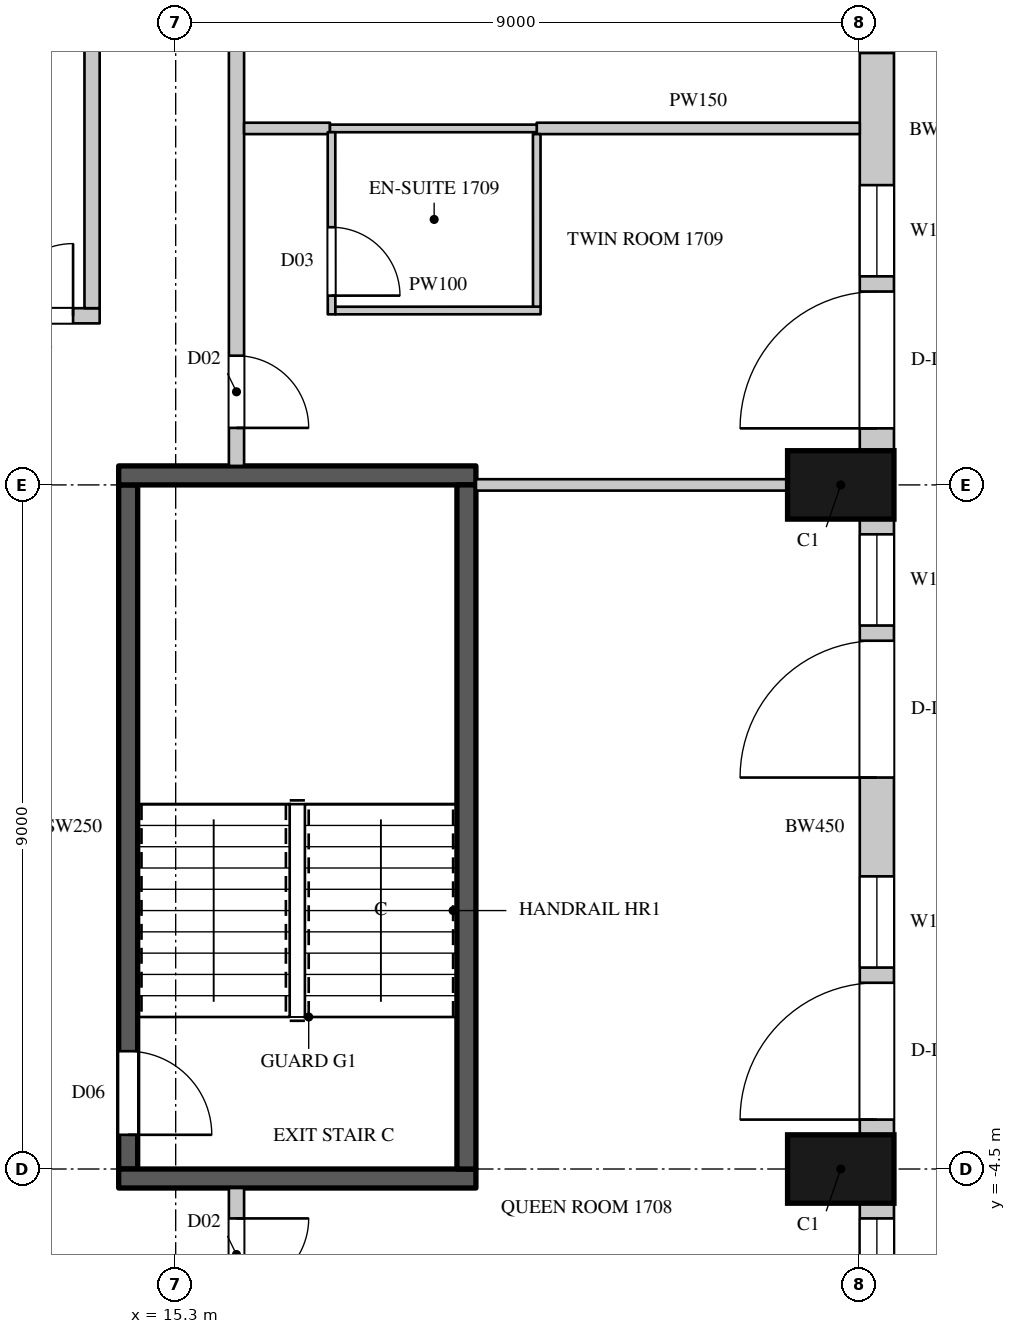
"""IFC4 building model, lengths in metres.
Left out: names, types, materials, properties, quantities, classifications, styles, units other than length and angle.
Written with IfcOpenShell. Run it as: python <this file> out.ifc"""

import sys

from ifc_helpers import new_model, si_unit, direction, frame, frame_2d, origin, origin_2d, place, context, subcontext, project, spatial, rectangle, extrude, element, fill, save


model = new_model("IFC4")
c1 = context("Model", 3, precision=1e-05, world=origin(), true_north=direction((0.0, 1.0)))
c2 = subcontext(c1, "Body", "Model", "MODEL_VIEW")
j1 = project(units=[si_unit("LENGTHUNIT", "METRE"), si_unit("PLANEANGLEUNIT", "RADIAN")], contexts=[c1])
p1 = place(None, origin())
s1 = spatial("IfcSite", under=j1, at=p1, CompositionType="ELEMENT")
p2 = place(p1, origin())
s2 = spatial("IfcBuilding", under=s1, at=p2, CompositionType="ELEMENT")
p3 = place(p2, frame((0.0, 0.0, 91.5)))
s3 = spatial("IfcBuildingStorey", under=s2, at=p3, CompositionType="ELEMENT", Elevation=91.5)
for number, where, z_axis, x_axis in (
    (1, (24.05, -4.5, 0.0), (0.0, 0.0, 1.0), (0.0, 1.0, 0.0)),
    (2, (24.05, 4.5, 0.0), (0.0, 0.0, 1.0), (0.0, 1.0, 0.0)),
):
    element("IfcColumn", number, at=place(p3, frame(where, z_axis=z_axis, x_axis=x_axis)), inside=s3, PredefinedType="COLUMN", context=c2, shape_type="SweptSolid", body=[
        extrude(rectangle(XDim=0.9, YDim=1.4, at=origin_2d()), origin(), (0.0, 0.0, 1.0), 3.6),
    ])
p4 = place(p3, frame((24.525, -13.05, 0.0), z_axis=(0.0, 0.0, 1.0), x_axis=(0.0, 1.0, 0.0)))
e3 = element("IfcWall", 3, at=p4, inside=s3, PredefinedType="SOLIDWALL", context=c2, shape_type="SweptSolid", body=[
    extrude(rectangle(XDim=8.1, YDim=0.45, at=frame_2d((4.05, 0.0))), origin(), (0.0, 0.0, 1.0), 3.3),
])
p5 = place(p4, frame((0.9, 0.0, 0.0)))
e4 = element("IfcOpeningElement", 4, at=p5, cuts=e3, PredefinedType="OPENING", context=c2, shape_type="SweptSolid", body=[
    extrude(rectangle(XDim=1.8, YDim=2.4, at=frame_2d((0.9, 1.2))), frame((0.0, 0.235, 0.0), z_axis=(0.0, -1.0, 0.0), x_axis=(1.0, 0.0, 0.0)), (0.0, 0.0, 1.0), 0.47),
])
p6 = place(p4, frame((4.7, 0.0, 0.0)))
e5 = element("IfcOpeningElement", 5, at=p6, cuts=e3, PredefinedType="OPENING", context=c2, shape_type="SweptSolid", body=[
    extrude(rectangle(XDim=1.8, YDim=2.4, at=frame_2d((0.9, 1.2))), frame((0.0, 0.235, 0.0), z_axis=(0.0, -1.0, 0.0), x_axis=(1.0, 0.0, 0.0)), (0.0, 0.0, 1.0), 0.47),
])
p7 = place(p4, frame((6.7, 0.0, 1.05)))
e6 = element("IfcOpeningElement", 6, at=p7, cuts=e3, PredefinedType="OPENING", context=c2, shape_type="SweptSolid", body=[
    extrude(rectangle(XDim=1.2, YDim=2.0, at=frame_2d((0.6, 1.0))), frame((0.0, 0.235, 0.0), z_axis=(0.0, -1.0, 0.0), x_axis=(1.0, 0.0, 0.0)), (0.0, 0.0, 1.0), 0.47),
])
p8 = place(p3, frame((24.525, -4.05, 0.0), z_axis=(0.0, 0.0, 1.0), x_axis=(0.0, 1.0, 0.0)))
e7 = element("IfcWall", 7, at=p8, inside=s3, PredefinedType="SOLIDWALL", context=c2, shape_type="SweptSolid", body=[
    extrude(rectangle(XDim=8.1, YDim=0.45, at=frame_2d((4.05, 0.0))), origin(), (0.0, 0.0, 1.0), 3.3),
])
p9 = place(p8, frame((0.2, 0.0, 0.0)))
e8 = element("IfcOpeningElement", 8, at=p9, cuts=e7, PredefinedType="OPENING", context=c2, shape_type="SweptSolid", body=[
    extrude(rectangle(XDim=1.8, YDim=2.4, at=frame_2d((0.9, 1.2))), frame((0.0, 0.235, 0.0), z_axis=(0.0, -1.0, 0.0), x_axis=(1.0, 0.0, 0.0)), (0.0, 0.0, 1.0), 0.47),
])
p10 = place(p8, frame((2.2, 0.0, 1.05)))
e9 = element("IfcOpeningElement", 9, at=p10, cuts=e7, PredefinedType="OPENING", context=c2, shape_type="SweptSolid", body=[
    extrude(rectangle(XDim=1.2, YDim=2.0, at=frame_2d((0.6, 1.0))), frame((0.0, 0.235, 0.0), z_axis=(0.0, -1.0, 0.0), x_axis=(1.0, 0.0, 0.0)), (0.0, 0.0, 1.0), 0.47),
])
p11 = place(p8, frame((4.7, 0.0, 0.0)))
e10 = element("IfcOpeningElement", 10, at=p11, cuts=e7, PredefinedType="OPENING", context=c2, shape_type="SweptSolid", body=[
    extrude(rectangle(XDim=1.8, YDim=2.4, at=frame_2d((0.9, 1.2))), frame((0.0, 0.235, 0.0), z_axis=(0.0, -1.0, 0.0), x_axis=(1.0, 0.0, 0.0)), (0.0, 0.0, 1.0), 0.47),
])
p12 = place(p8, frame((6.7, 0.0, 1.05)))
e11 = element("IfcOpeningElement", 11, at=p12, cuts=e7, PredefinedType="OPENING", context=c2, shape_type="SweptSolid", body=[
    extrude(rectangle(XDim=1.2, YDim=2.0, at=frame_2d((0.6, 1.0))), frame((0.0, 0.235, 0.0), z_axis=(0.0, -1.0, 0.0), x_axis=(1.0, 0.0, 0.0)), (0.0, 0.0, 1.0), 0.47),
])
p13 = place(p3, frame((24.525, 4.95, 0.0), z_axis=(0.0, 0.0, 1.0), x_axis=(0.0, 1.0, 0.0)))
e12 = element("IfcWall", 12, at=p13, inside=s3, PredefinedType="SOLIDWALL", context=c2, shape_type="SweptSolid", body=[
    extrude(rectangle(XDim=8.439, YDim=0.45, at=frame_2d((4.219, 0.0))), origin(), (0.0, 0.0, 1.0), 3.3),
])
p14 = place(p13, frame((0.294, 0.0, 0.0)))
e13 = element("IfcOpeningElement", 13, at=p14, cuts=e12, PredefinedType="OPENING", context=c2, shape_type="SweptSolid", body=[
    extrude(rectangle(XDim=1.8, YDim=2.4, at=frame_2d((0.9, 1.2))), frame((0.0, 0.235, 0.0), z_axis=(0.0, -1.0, 0.0), x_axis=(1.0, 0.0, 0.0)), (0.0, 0.0, 1.0), 0.47),
])
p15 = place(p13, frame((2.294, 0.0, 1.05)))
e14 = element("IfcOpeningElement", 14, at=p15, cuts=e12, PredefinedType="OPENING", context=c2, shape_type="SweptSolid", body=[
    extrude(rectangle(XDim=1.2, YDim=2.0, at=frame_2d((0.6, 1.0))), frame((0.0, 0.235, 0.0), z_axis=(0.0, -1.0, 0.0), x_axis=(1.0, 0.0, 0.0)), (0.0, 0.0, 1.0), 0.47),
])
p16 = place(p13, frame((5.232, 0.0, 1.05)))
e15 = element("IfcOpeningElement", 15, at=p16, cuts=e12, PredefinedType="OPENING", context=c2, shape_type="SweptSolid", body=[
    extrude(rectangle(XDim=2.7, YDim=2.0, at=frame_2d((1.35, 1.0))), frame((0.0, 0.235, 0.0), z_axis=(0.0, -1.0, 0.0), x_axis=(1.0, 0.0, 0.0)), (0.0, 0.0, 1.0), 0.47),
])
p17 = place(p3, frame((10.9, 6.725, 0.0), z_axis=(0.0, 0.0, 1.0), x_axis=(1.0, 0.0, 0.0)))
e16 = element("IfcWall", 16, at=p17, inside=s3, PredefinedType="PARTITIONING", context=c2, shape_type="SweptSolid", body=[
    extrude(rectangle(XDim=3.4, YDim=0.2, at=frame_2d((1.7, 0.0))), origin(), (0.0, 0.0, 1.0), 3.3),
])
p18 = place(p17, frame((2.1, 0.0, 0.0)))
e17 = element("IfcOpeningElement", 17, at=p18, cuts=e16, PredefinedType="OPENING", context=c2, shape_type="SweptSolid", body=[
    extrude(rectangle(XDim=0.95, YDim=2.2, at=frame_2d((0.475, 1.1))), frame((0.0, 0.11, 0.0), z_axis=(0.0, -1.0, 0.0), x_axis=(1.0, 0.0, 0.0)), (0.0, 0.0, 1.0), 0.22),
])
p19 = place(p3, frame((14.2, 6.825, 0.0), z_axis=(0.0, 0.0, 1.0), x_axis=(0.0, 1.0, 0.0)))
e18 = element("IfcWall", 18, at=p19, inside=s3, PredefinedType="PARTITIONING", context=c2, shape_type="SweptSolid", body=[
    extrude(rectangle(XDim=8.675, YDim=0.2, at=frame_2d((4.337, 0.0))), origin(), (0.0, 0.0, 1.0), 3.3),
])
p20 = place(p3, frame((16.1, -17.5, 0.0), z_axis=(0.0, 0.0, 1.0), x_axis=(0.0, 1.0, 0.0)))
e19 = element("IfcWall", 19, at=p20, inside=s3, PredefinedType="PARTITIONING", context=c2, shape_type="SweptSolid", body=[
    extrude(rectangle(XDim=12.75, YDim=0.2, at=frame_2d((6.375, 0.0))), origin(), (0.0, 0.0, 1.0), 3.3),
])
p21 = place(p20, frame((2.75, 0.0, 0.0)))
e20 = element("IfcOpeningElement", 20, at=p21, cuts=e19, PredefinedType="OPENING", context=c2, shape_type="SweptSolid", body=[
    extrude(rectangle(XDim=0.95, YDim=2.2, at=frame_2d((0.475, 1.1))), frame((0.0, 0.11, 0.0), z_axis=(0.0, -1.0, 0.0), x_axis=(1.0, 0.0, 0.0)), (0.0, 0.0, 1.0), 0.22),
])
p22 = place(p20, frame((6.95, 0.0, 0.0)))
e21 = element("IfcOpeningElement", 21, at=p22, cuts=e19, PredefinedType="OPENING", context=c2, shape_type="SweptSolid", body=[
    extrude(rectangle(XDim=0.95, YDim=2.2, at=frame_2d((0.475, 1.1))), frame((0.0, 0.11, 0.0), z_axis=(0.0, -1.0, 0.0), x_axis=(1.0, 0.0, 0.0)), (0.0, 0.0, 1.0), 0.22),
])
p23 = place(p20, frame((11.4, 0.0, 0.0)))
e22 = element("IfcOpeningElement", 22, at=p23, cuts=e19, PredefinedType="OPENING", context=c2, shape_type="SweptSolid", body=[
    extrude(rectangle(XDim=0.95, YDim=2.2, at=frame_2d((0.475, 1.1))), frame((0.0, 0.11, 0.0), z_axis=(0.0, -1.0, 0.0), x_axis=(1.0, 0.0, 0.0)), (0.0, 0.0, 1.0), 0.22),
])
p24 = place(p3, frame((16.1, 4.75, 0.0), z_axis=(0.0, 0.0, 1.0), x_axis=(0.0, 1.0, 0.0)))
e23 = element("IfcWall", 23, at=p24, inside=s3, PredefinedType="PARTITIONING", context=c2, shape_type="SweptSolid", body=[
    extrude(rectangle(XDim=12.65, YDim=0.2, at=frame_2d((6.325, 0.0))), origin(), (0.0, 0.0, 1.0), 3.3),
])
p25 = place(p24, frame((0.5, 0.0, 0.0)))
e24 = element("IfcOpeningElement", 24, at=p25, cuts=e23, PredefinedType="OPENING", context=c2, shape_type="SweptSolid", body=[
    extrude(rectangle(XDim=0.95, YDim=2.2, at=frame_2d((0.475, 1.1))), frame((0.0, 0.11, 0.0), z_axis=(0.0, -1.0, 0.0), x_axis=(1.0, 0.0, 0.0)), (0.0, 0.0, 1.0), 0.22),
])
p26 = place(p24, frame((6.9, 0.0, 0.0)))
e25 = element("IfcOpeningElement", 25, at=p26, cuts=e23, PredefinedType="OPENING", context=c2, shape_type="SweptSolid", body=[
    extrude(rectangle(XDim=0.95, YDim=2.2, at=frame_2d((0.475, 1.1))), frame((0.0, 0.11, 0.0), z_axis=(0.0, -1.0, 0.0), x_axis=(1.0, 0.0, 0.0)), (0.0, 0.0, 1.0), 0.22),
])
p27 = place(p3, frame((16.2, 9.19, 0.0), z_axis=(0.0, 0.0, 1.0), x_axis=(1.0, 0.0, 0.0)))
e26 = element("IfcWall", 26, at=p27, inside=s3, PredefinedType="PARTITIONING", context=c2, shape_type="SweptSolid", body=[
    extrude(rectangle(XDim=1.13, YDim=0.15, at=frame_2d((0.565, 0.0))), origin(), (0.0, 0.0, 1.0), 2.65),
])
p28 = place(p3, frame((19.25, 4.5, 0.0), z_axis=(0.0, 0.0, 1.0), x_axis=(1.0, 0.0, 0.0)))
e27 = element("IfcWall", 27, at=p28, inside=s3, PredefinedType="PARTITIONING", context=c2, shape_type="SweptSolid", body=[
    extrude(rectangle(XDim=4.1, YDim=0.15, at=frame_2d((2.05, 0.0))), origin(), (0.0, 0.0, 1.0), 3.3),
])
p29 = place(p3, frame((20.05, 9.19, 0.0), z_axis=(0.0, 0.0, 1.0), x_axis=(1.0, 0.0, 0.0)))
e28 = element("IfcWall", 28, at=p29, inside=s3, PredefinedType="PARTITIONING", context=c2, shape_type="SweptSolid", body=[
    extrude(rectangle(XDim=4.25, YDim=0.15, at=frame_2d((2.125, 0.0))), origin(), (0.0, 0.0, 1.0), 2.65),
])
p30 = place(p3, frame((14.675, -4.5, 0.0), z_axis=(0.0, 0.0, 1.0), x_axis=(0.0, 1.0, 0.0)))
e29 = element("IfcWall", 29, at=p30, inside=s3, PredefinedType="SHEAR", context=c2, shape_type="SweptSolid", body=[
    extrude(rectangle(XDim=9.0, YDim=0.25, at=frame_2d((4.5, 0.0))), origin(), (0.0, 0.0, 1.0), 3.3),
])
p31 = place(p30, frame((0.45, 0.0, 0.0)))
e30 = element("IfcOpeningElement", 30, at=p31, cuts=e29, PredefinedType="OPENING", context=c2, shape_type="SweptSolid", body=[
    extrude(rectangle(XDim=1.1, YDim=2.2, at=frame_2d((0.55, 1.1))), frame((0.0, 0.135, 0.0), z_axis=(0.0, -1.0, 0.0), x_axis=(1.0, 0.0, 0.0)), (0.0, 0.0, 1.0), 0.27),
])
for number, where, z_axis, x_axis in (
    (31, (14.55, -4.625, 0.0), (0.0, 0.0, 1.0), (1.0, 0.0, 0.0)),
    (32, (14.55, 4.625, 0.0), (0.0, 0.0, 1.0), (1.0, 0.0, 0.0)),
):
    element("IfcWall", number, at=place(p3, frame(where, z_axis=z_axis, x_axis=x_axis)), inside=s3, PredefinedType="SHEAR", context=c2, shape_type="SweptSolid", body=[
        extrude(rectangle(XDim=4.7, YDim=0.25, at=frame_2d((2.35, 0.0))), origin(), (0.0, 0.0, 1.0), 3.3),
    ])
p32 = place(p3, frame((19.125, -4.5, 0.0), z_axis=(0.0, 0.0, 1.0), x_axis=(0.0, 1.0, 0.0)))
e33 = element("IfcWall", 33, at=p32, inside=s3, PredefinedType="SHEAR", context=c2, shape_type="SweptSolid", body=[
    extrude(rectangle(XDim=9.0, YDim=0.25, at=frame_2d((4.5, 0.0))), origin(), (0.0, 0.0, 1.0), 3.3),
])
p33 = place(p3, frame((17.33, 9.19, 0.0), z_axis=(0.0, 0.0, 1.0), x_axis=(1.0, 0.0, 0.0)))
e34 = element("IfcWall", 34, at=p33, inside=s3, PredefinedType="PARTITIONING", context=c2, shape_type="SweptSolid", body=[
    extrude(rectangle(XDim=2.72, YDim=0.1, at=frame_2d((1.36, 0.0))), origin(), (0.0, 0.0, 1.0), 2.65),
])
p34 = place(p3, frame((17.35, 9.14, 0.0), z_axis=(0.0, 0.0, 1.0), x_axis=(0.000407580973, -0.999999916939, 0.0)))
e35 = element("IfcWall", 35, at=p34, inside=s3, PredefinedType="PARTITIONING", context=c2, shape_type="SweptSolid", body=[
    extrude(rectangle(XDim=2.396, YDim=0.1, at=frame_2d((1.198, 0.0))), origin(), (0.0, 0.0, 1.0), 3.3),
])
p35 = place(p34, frame((1.25, 0.0, 0.0)))
e36 = element("IfcOpeningElement", 36, at=p35, cuts=e35, PredefinedType="OPENING", context=c2, shape_type="SweptSolid", body=[
    extrude(rectangle(XDim=0.9, YDim=2.2, at=frame_2d((0.45, 1.1))), frame((0.0, 0.06, 0.0), z_axis=(0.0, -1.0, 0.0), x_axis=(1.0, 0.0, 0.0)), (0.0, 0.0, 1.0), 0.12),
])
p36 = place(p3, frame((17.401, 6.794, 0.0), z_axis=(0.0, 0.0, 1.0), x_axis=(0.9999999346, 0.000361663629, 0.0)))
e37 = element("IfcWall", 37, at=p36, inside=s3, PredefinedType="PARTITIONING", context=c2, shape_type="SweptSolid", body=[
    extrude(rectangle(XDim=2.7, YDim=0.1, at=frame_2d((1.35, 0.0))), origin(), (0.0, 0.0, 1.0), 3.3),
])
p37 = place(p3, frame((20.05, 9.115, 0.0), z_axis=(0.0, 0.0, 1.0), x_axis=(0.000430200003, -0.999999907464, 0.0)))
e38 = element("IfcWall", 38, at=p37, inside=s3, PredefinedType="PARTITIONING", context=c2, shape_type="SweptSolid", body=[
    extrude(rectangle(XDim=2.27, YDim=0.1, at=frame_2d((1.135, 0.0))), origin(), (0.0, 0.0, 1.0), 3.3),
])
p38 = place(p7, origin())
e39 = element("IfcWindow", 39, at=p38, inside=s3, PartitioningType="SINGLE_PANEL", PredefinedType="WINDOW", context=c2, shape_type="SweptSolid", body=[
    extrude(rectangle(XDim=1.2, YDim=2.0, at=frame_2d((0.6, 1.0))), frame((0.0, 0.135, 0.0), z_axis=(0.0, -1.0, 0.0), x_axis=(1.0, 0.0, 0.0)), (0.0, 0.0, 1.0), 0.06),
])
fill(e6, e39)
p39 = place(p9, origin())
e40 = element("IfcDoor", 40, at=p39, inside=s3, OperationType="SLIDING_TO_LEFT", PredefinedType="DOOR", context=c2, shape_type="SweptSolid", body=[
    extrude(rectangle(XDim=1.8, YDim=2.4, at=frame_2d((0.9, 1.2))), frame((0.0, 0.13, 0.0), z_axis=(0.0, -1.0, 0.0), x_axis=(1.0, 0.0, 0.0)), (0.0, 0.0, 1.0), 0.05),
])
fill(e8, e40)
p40 = place(p10, origin())
e41 = element("IfcWindow", 41, at=p40, inside=s3, PartitioningType="SINGLE_PANEL", PredefinedType="WINDOW", context=c2, shape_type="SweptSolid", body=[
    extrude(rectangle(XDim=1.2, YDim=2.0, at=frame_2d((0.6, 1.0))), frame((0.0, 0.135, 0.0), z_axis=(0.0, -1.0, 0.0), x_axis=(1.0, 0.0, 0.0)), (0.0, 0.0, 1.0), 0.06),
])
fill(e9, e41)
p41 = place(p11, origin())
e42 = element("IfcDoor", 42, at=p41, inside=s3, OperationType="SLIDING_TO_LEFT", PredefinedType="DOOR", context=c2, shape_type="SweptSolid", body=[
    extrude(rectangle(XDim=1.8, YDim=2.4, at=frame_2d((0.9, 1.2))), frame((0.0, 0.13, 0.0), z_axis=(0.0, -1.0, 0.0), x_axis=(1.0, 0.0, 0.0)), (0.0, 0.0, 1.0), 0.05),
])
fill(e10, e42)
p42 = place(p12, origin())
e43 = element("IfcWindow", 43, at=p42, inside=s3, PartitioningType="SINGLE_PANEL", PredefinedType="WINDOW", context=c2, shape_type="SweptSolid", body=[
    extrude(rectangle(XDim=1.2, YDim=2.0, at=frame_2d((0.6, 1.0))), frame((0.0, 0.135, 0.0), z_axis=(0.0, -1.0, 0.0), x_axis=(1.0, 0.0, 0.0)), (0.0, 0.0, 1.0), 0.06),
])
fill(e11, e43)
p43 = place(p14, origin())
e44 = element("IfcDoor", 44, at=p43, inside=s3, OperationType="SLIDING_TO_LEFT", PredefinedType="DOOR", context=c2, shape_type="SweptSolid", body=[
    extrude(rectangle(XDim=1.8, YDim=2.4, at=frame_2d((0.9, 1.2))), frame((0.0, 0.13, 0.0), z_axis=(0.0, -1.0, 0.0), x_axis=(1.0, 0.0, 0.0)), (0.0, 0.0, 1.0), 0.05),
])
fill(e13, e44)
p44 = place(p15, origin())
e45 = element("IfcWindow", 45, at=p44, inside=s3, PartitioningType="SINGLE_PANEL", PredefinedType="WINDOW", context=c2, shape_type="SweptSolid", body=[
    extrude(rectangle(XDim=1.2, YDim=2.0, at=frame_2d((0.6, 1.0))), frame((0.0, 0.135, 0.0), z_axis=(0.0, -1.0, 0.0), x_axis=(1.0, 0.0, 0.0)), (0.0, 0.0, 1.0), 0.06),
])
fill(e14, e45)
p45 = place(p16, origin())
e46 = element("IfcWindow", 46, at=p45, inside=s3, PartitioningType="SINGLE_PANEL", PredefinedType="WINDOW", context=c2, shape_type="SweptSolid", body=[
    extrude(rectangle(XDim=2.7, YDim=2.0, at=frame_2d((1.35, 1.0))), frame((0.0, 0.135, 0.0), z_axis=(0.0, -1.0, 0.0), x_axis=(1.0, 0.0, 0.0)), (0.0, 0.0, 1.0), 0.06),
])
fill(e15, e46)
p46 = place(p18, origin())
e47 = element("IfcDoor", 47, at=p46, inside=s3, OperationType="SINGLE_SWING_RIGHT", PredefinedType="DOOR", context=c2, shape_type="SweptSolid", body=[
    extrude(rectangle(XDim=0.95, YDim=2.2, at=frame_2d((0.475, 1.1))), frame((0.0, 0.025, 0.0), z_axis=(0.0, -1.0, 0.0), x_axis=(1.0, 0.0, 0.0)), (0.0, 0.0, 1.0), 0.05),
])
fill(e17, e47)
p47 = place(p23, origin())
e48 = element("IfcDoor", 48, at=p47, inside=s3, OperationType="SINGLE_SWING_LEFT", PredefinedType="DOOR", context=c2, shape_type="SweptSolid", body=[
    extrude(rectangle(XDim=0.95, YDim=2.2, at=frame_2d((0.475, 1.1))), frame((0.0, 0.025, 0.0), z_axis=(0.0, -1.0, 0.0), x_axis=(1.0, 0.0, 0.0)), (0.0, 0.0, 1.0), 0.05),
])
fill(e22, e48)
p48 = place(p25, origin())
e49 = element("IfcDoor", 49, at=p48, inside=s3, OperationType="SINGLE_SWING_RIGHT", PredefinedType="DOOR", context=c2, shape_type="SweptSolid", body=[
    extrude(rectangle(XDim=0.95, YDim=2.2, at=frame_2d((0.475, 1.1))), frame((0.0, 0.025, 0.0), z_axis=(0.0, -1.0, 0.0), x_axis=(1.0, 0.0, 0.0)), (0.0, 0.0, 1.0), 0.05),
])
fill(e24, e49)
p49 = place(p35, origin())
e50 = element("IfcDoor", 50, at=p49, inside=s3, OperationType="SINGLE_SWING_RIGHT", PredefinedType="DOOR", context=c2, shape_type="SweptSolid", body=[
    extrude(rectangle(XDim=0.9, YDim=2.2, at=frame_2d((0.45, 1.1))), frame((0.0, 0.025, 0.0), z_axis=(0.0, -1.0, 0.0), x_axis=(1.0, 0.0, 0.0)), (0.0, 0.0, 1.0), 0.05),
])
fill(e36, e50)
p50 = place(p31, origin())
e51 = element("IfcDoor", 51, at=p50, inside=s3, OperationType="SINGLE_SWING_RIGHT", PredefinedType="DOOR", context=c2, shape_type="SweptSolid", body=[
    extrude(rectangle(XDim=1.1, YDim=2.2, at=frame_2d((0.55, 1.1))), frame((0.0, 0.025, 0.0), z_axis=(0.0, -1.0, 0.0), x_axis=(1.0, 0.0, 0.0)), (0.0, 0.0, 1.0), 0.05),
])
fill(e30, e51)
save(model, sys.argv[1])
